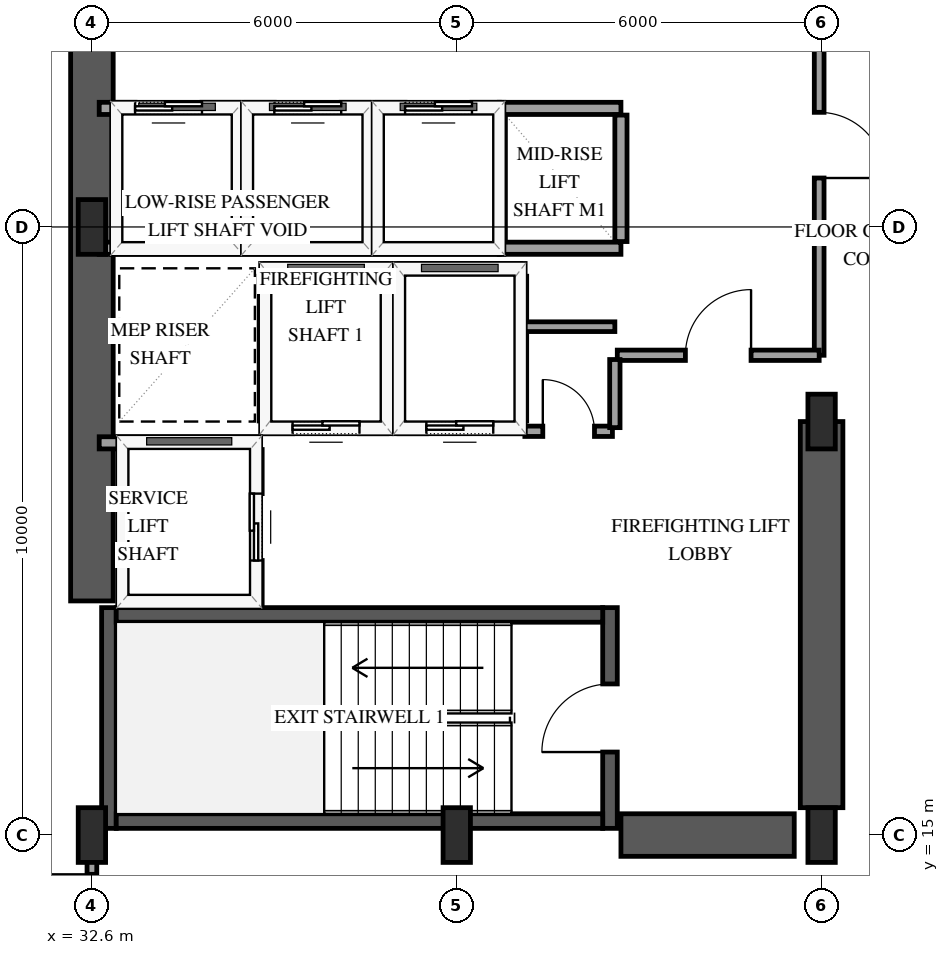
"""IFC4 building model, lengths in metres.
Left out: names, types, materials, properties, quantities, classifications, styles, units other than length and angle.
Written with IfcOpenShell. Run it as: python <this file> out.ifc"""

import sys

from ifc_helpers import new_model, si_unit, direction, frame, frame_2d, origin, origin_2d, place, context, subcontext, project, spatial, rectangle, extrude, element, fill, save


model = new_model("IFC4")
c1 = context("Model", 3, precision=1e-05, world=origin(), true_north=direction((0.0, 1.0)))
c2 = subcontext(c1, "Body", "Model", "MODEL_VIEW")
j1 = project(units=[si_unit("LENGTHUNIT", "METRE"), si_unit("PLANEANGLEUNIT", "RADIAN")], contexts=[c1])
p1 = place(None, origin())
s1 = spatial("IfcSite", under=j1, at=p1, CompositionType="ELEMENT")
p2 = place(p1, origin())
s2 = spatial("IfcBuilding", under=s1, at=p2, CompositionType="ELEMENT")
p3 = place(p2, frame((0.0, 0.0, 50.6)))
s3 = spatial("IfcBuildingStorey", under=s2, at=p3, CompositionType="ELEMENT", Elevation=50.6)
p4 = place(p3, frame((32.88, 15.11, 0.0), z_axis=(0.0, 0.0, 1.0), x_axis=(0.0, 1.0, 0.0)))
e1 = element("IfcWall", 1, at=p4, inside=s3, PredefinedType="SHEAR", context=c2, shape_type="SweptSolid", body=[
    extrude(rectangle(XDim=3.63, YDim=0.24, at=frame_2d((1.815, 0.0))), origin(), (0.0, 0.0, 1.0), 4.0),
])
p5 = place(p3, frame((41.12, 15.11, 0.0), z_axis=(0.0, 0.0, 1.0), x_axis=(0.0, 1.0, 0.0)))
e2 = element("IfcWall", 2, at=p5, inside=s3, PredefinedType="SHEAR", context=c2, shape_type="SweptSolid", body=[
    extrude(rectangle(XDim=3.63, YDim=0.24, at=frame_2d((1.815, 0.0))), origin(), (0.0, 0.0, 1.0), 4.0),
])
p6 = place(p5, frame((1.255, 0.0, 0.0)))
e3 = element("IfcOpeningElement", 3, at=p6, cuts=e2, PredefinedType="OPENING", context=c2, shape_type="SweptSolid", body=[
    extrude(rectangle(XDim=1.12, YDim=2.15, at=frame_2d((0.56, 1.075))), frame((0.0, 0.13, 0.0), z_axis=(0.0, -1.0, 0.0), x_axis=(1.0, 0.0, 0.0)), (0.0, 0.0, 1.0), 0.26),
])
for number, where, z_axis, x_axis in (
    (4, (33.0, 15.23, 0.0), (0.0, 0.0, 1.0), (1.0, 0.0, 0.0)),
    (5, (33.0, 18.62, 0.0), (0.0, 0.0, 1.0), (1.0, 0.0, 0.0)),
):
    element("IfcWall", number, at=place(p3, frame(where, z_axis=z_axis, x_axis=x_axis)), inside=s3, PredefinedType="SHEAR", context=c2, shape_type="SweptSolid", body=[
        extrude(rectangle(XDim=8.0, YDim=0.24, at=frame_2d((4.0, 0.0))), origin(), (0.0, 0.0, 1.0), 4.0),
    ])
p7 = place(p3, frame((32.6, 18.85, 0.0), z_axis=(0.0, 0.0, 1.0), x_axis=(0.0, 1.0, 0.0)))
e6 = element("IfcWall", 6, at=p7, inside=s3, PredefinedType="SHEAR", context=c2, shape_type="SweptSolid", body=[
    extrude(rectangle(XDim=12.3, YDim=0.7, at=frame_2d((6.15, 0.0))), origin(), (0.0, 0.0, 1.0), 4.0),
])
p8 = place(p3, frame((41.3, 15.0, 0.0), z_axis=(0.0, 0.0, 1.0), x_axis=(1.0, 0.0, 0.0)))
e7 = element("IfcWall", 7, at=p8, inside=s3, PredefinedType="SHEAR", context=c2, shape_type="SweptSolid", body=[
    extrude(rectangle(XDim=2.85, YDim=0.7, at=frame_2d((1.425, 0.0))), origin(), (0.0, 0.0, 1.0), 4.0),
])
p9 = place(p3, frame((44.6, 15.45, 0.0), z_axis=(0.0, 0.0, 1.0), x_axis=(0.0, 1.0, 0.0)))
e8 = element("IfcWall", 8, at=p9, inside=s3, PredefinedType="SHEAR", context=c2, shape_type="SweptSolid", body=[
    extrude(rectangle(XDim=6.35, YDim=0.7, at=frame_2d((3.175, 0.0))), origin(), (0.0, 0.0, 1.0), 4.0),
])
for number, where, z_axis, x_axis in (
    (9, (32.6, 15.0, 0.0), (0.0, 0.0, 1.0), (1.0, 0.0, 0.0)),
    (10, (32.6, 25.0, 0.0), (0.0, 0.0, 1.0), (1.0, 0.0, 0.0)),
    (11, (38.6, 15.0, 0.0), (0.0, 0.0, 1.0), (1.0, 0.0, 0.0)),
    (12, (44.6, 15.0, 0.0), (0.0, 0.0, 1.0), (1.0, 0.0, 0.0)),
    (13, (44.6, 21.8, 0.0), (0.0, 0.0, 1.0), (1.0, 0.0, 0.0)),
):
    element("IfcColumn", number, at=place(p3, frame(where, z_axis=z_axis, x_axis=x_axis)), inside=s3, PredefinedType="PILASTER", context=c2, shape_type="SweptSolid", body=[
        extrude(rectangle(XDim=0.45, YDim=0.9, at=origin_2d()), origin(), (0.0, 0.0, 1.0), 4.0),
    ])
p10 = place(p3, frame((35.45, 21.7, 0.0), z_axis=(0.0, 0.0, 1.0), x_axis=(1.0, 0.0, 0.0)))
e14 = element("IfcWall", 14, at=p10, inside=s3, PredefinedType="SOLIDWALL", context=c2, shape_type="SweptSolid", body=[
    extrude(rectangle(XDim=2.0, YDim=0.2, at=frame_2d((1.0, 0.0))), origin(), (0.0, 0.0, 1.0), 3.7),
])
p11 = place(p10, frame((0.45, 0.0, 0.0)))
e15 = element("IfcOpeningElement", 15, at=p11, cuts=e14, PredefinedType="OPENING", context=c2, shape_type="SweptSolid", body=[
    extrude(rectangle(XDim=1.1, YDim=2.15, at=frame_2d((0.55, 1.075))), frame((0.0, 0.11, 0.0), z_axis=(0.0, -1.0, 0.0), x_axis=(1.0, 0.0, 0.0)), (0.0, 0.0, 1.0), 0.22),
])
p12 = place(p3, frame((35.45, 24.3, 0.0), z_axis=(0.0, 0.0, 1.0), x_axis=(1.0, 0.0, 0.0)))
e16 = element("IfcWall", 16, at=p12, inside=s3, PredefinedType="SOLIDWALL", context=c2, shape_type="SweptSolid", body=[
    extrude(rectangle(XDim=2.0, YDim=0.2, at=frame_2d((1.0, 0.0))), origin(), (0.0, 0.0, 1.0), 3.7),
])
for number, where, z_axis, x_axis in (
    (17, (35.45, 21.81, 0.0), (0.0, 0.0, 1.0), (0.0, 1.0, 0.0)),
    (18, (37.45, 21.81, 0.0), (0.0, 0.0, 1.0), (0.0, 1.0, 0.0)),
):
    element("IfcWall", number, at=place(p3, frame(where, z_axis=z_axis, x_axis=x_axis)), inside=s3, PredefinedType="SOLIDWALL", context=c2, shape_type="SweptSolid", body=[
        extrude(rectangle(XDim=2.38, YDim=0.2, at=frame_2d((1.19, 0.0))), origin(), (0.0, 0.0, 1.0), 3.7),
    ])
p13 = place(p3, frame((37.65, 21.7, 0.0), z_axis=(0.0, 0.0, 1.0), x_axis=(1.0, 0.0, 0.0)))
e19 = element("IfcWall", 19, at=p13, inside=s3, PredefinedType="SOLIDWALL", context=c2, shape_type="SweptSolid", body=[
    extrude(rectangle(XDim=2.0, YDim=0.2, at=frame_2d((1.0, 0.0))), origin(), (0.0, 0.0, 1.0), 3.7),
])
p14 = place(p13, frame((0.45, 0.0, 0.0)))
e20 = element("IfcOpeningElement", 20, at=p14, cuts=e19, PredefinedType="OPENING", context=c2, shape_type="SweptSolid", body=[
    extrude(rectangle(XDim=1.1, YDim=2.15, at=frame_2d((0.55, 1.075))), frame((0.0, 0.11, 0.0), z_axis=(0.0, -1.0, 0.0), x_axis=(1.0, 0.0, 0.0)), (0.0, 0.0, 1.0), 0.22),
])
p15 = place(p3, frame((37.65, 24.3, 0.0), z_axis=(0.0, 0.0, 1.0), x_axis=(1.0, 0.0, 0.0)))
e21 = element("IfcWall", 21, at=p15, inside=s3, PredefinedType="SOLIDWALL", context=c2, shape_type="SweptSolid", body=[
    extrude(rectangle(XDim=2.0, YDim=0.2, at=frame_2d((1.0, 0.0))), origin(), (0.0, 0.0, 1.0), 3.7),
])
p16 = place(p3, frame((39.65, 21.81, 0.0), z_axis=(0.0, 0.0, 1.0), x_axis=(0.0, 1.0, 0.0)))
e22 = element("IfcWall", 22, at=p16, inside=s3, PredefinedType="SOLIDWALL", context=c2, shape_type="SweptSolid", body=[
    extrude(rectangle(XDim=2.38, YDim=0.2, at=frame_2d((1.19, 0.0))), origin(), (0.0, 0.0, 1.0), 3.7),
])
p17 = place(p3, frame((32.72, 21.45, 0.0), z_axis=(0.0, 0.0, 1.0), x_axis=(1.0, 0.0, 0.0)))
e23 = element("IfcWall", 23, at=p17, inside=s3, PredefinedType="SOLIDWALL", context=c2, shape_type="SweptSolid", body=[
    extrude(rectangle(XDim=2.58, YDim=0.2, at=frame_2d((1.29, 0.0))), origin(), (0.0, 0.0, 1.0), 3.7),
])
p18 = place(p3, frame((35.3, 18.79, 0.0), z_axis=(0.0, 0.0, 1.0), x_axis=(0.0, 1.0, 0.0)))
e24 = element("IfcWall", 24, at=p18, inside=s3, PredefinedType="SOLIDWALL", context=c2, shape_type="SweptSolid", body=[
    extrude(rectangle(XDim=2.55, YDim=0.2, at=frame_2d((1.275, 0.0))), origin(), (0.0, 0.0, 1.0), 3.7),
])
p19 = place(p18, frame((0.725, 0.0, 0.0)))
e25 = element("IfcOpeningElement", 25, at=p19, cuts=e24, PredefinedType="OPENING", context=c2, shape_type="SweptSolid", body=[
    extrude(rectangle(XDim=1.1, YDim=2.15, at=frame_2d((0.55, 1.075))), frame((0.0, 0.11, 0.0), z_axis=(0.0, -1.0, 0.0), x_axis=(1.0, 0.0, 0.0)), (0.0, 0.0, 1.0), 0.22),
])
p20 = place(p3, frame((32.72, 24.65, 0.0), z_axis=(0.0, 0.0, 1.0), x_axis=(1.0, 0.0, 0.0)))
e26 = element("IfcWall", 26, at=p20, inside=s3, PredefinedType="SOLIDWALL", context=c2, shape_type="SweptSolid", body=[
    extrude(rectangle(XDim=2.28, YDim=0.2, at=frame_2d((1.14, 0.0))), origin(), (0.0, 0.0, 1.0), 3.7),
])
p21 = place(p3, frame((32.72, 26.95, 0.0), z_axis=(0.0, 0.0, 1.0), x_axis=(1.0, 0.0, 0.0)))
e27 = element("IfcWall", 27, at=p21, inside=s3, PredefinedType="SOLIDWALL", context=c2, shape_type="SweptSolid", body=[
    extrude(rectangle(XDim=2.28, YDim=0.2, at=frame_2d((1.14, 0.0))), origin(), (0.0, 0.0, 1.0), 3.7),
])
p22 = place(p21, frame((0.59, 0.0, 0.0)))
e28 = element("IfcOpeningElement", 28, at=p22, cuts=e27, PredefinedType="OPENING", context=c2, shape_type="SweptSolid", body=[
    extrude(rectangle(XDim=1.1, YDim=2.15, at=frame_2d((0.55, 1.075))), frame((0.0, 0.11, 0.0), z_axis=(0.0, -1.0, 0.0), x_axis=(1.0, 0.0, 0.0)), (0.0, 0.0, 1.0), 0.22),
])
p23 = place(p3, frame((35.0, 24.76, 0.0), z_axis=(0.0, 0.0, 1.0), x_axis=(0.0, 1.0, 0.0)))
e29 = element("IfcWall", 29, at=p23, inside=s3, PredefinedType="SOLIDWALL", context=c2, shape_type="SweptSolid", body=[
    extrude(rectangle(XDim=2.08, YDim=0.2, at=frame_2d((1.04, 0.0))), origin(), (0.0, 0.0, 1.0), 3.7),
])
p24 = place(p3, frame((35.15, 24.65, 0.0), z_axis=(0.0, 0.0, 1.0), x_axis=(1.0, 0.0, 0.0)))
e30 = element("IfcWall", 30, at=p24, inside=s3, PredefinedType="SOLIDWALL", context=c2, shape_type="SweptSolid", body=[
    extrude(rectangle(XDim=2.0, YDim=0.2, at=frame_2d((1.0, 0.0))), origin(), (0.0, 0.0, 1.0), 3.7),
])
p25 = place(p3, frame((35.15, 26.95, 0.0), z_axis=(0.0, 0.0, 1.0), x_axis=(1.0, 0.0, 0.0)))
e31 = element("IfcWall", 31, at=p25, inside=s3, PredefinedType="SOLIDWALL", context=c2, shape_type="SweptSolid", body=[
    extrude(rectangle(XDim=2.0, YDim=0.2, at=frame_2d((1.0, 0.0))), origin(), (0.0, 0.0, 1.0), 3.7),
])
p26 = place(p25, frame((0.45, 0.0, 0.0)))
e32 = element("IfcOpeningElement", 32, at=p26, cuts=e31, PredefinedType="OPENING", context=c2, shape_type="SweptSolid", body=[
    extrude(rectangle(XDim=1.1, YDim=2.15, at=frame_2d((0.55, 1.075))), frame((0.0, 0.11, 0.0), z_axis=(0.0, -1.0, 0.0), x_axis=(1.0, 0.0, 0.0)), (0.0, 0.0, 1.0), 0.22),
])
p27 = place(p3, frame((37.15, 24.76, 0.0), z_axis=(0.0, 0.0, 1.0), x_axis=(0.0, 1.0, 0.0)))
e33 = element("IfcWall", 33, at=p27, inside=s3, PredefinedType="SOLIDWALL", context=c2, shape_type="SweptSolid", body=[
    extrude(rectangle(XDim=2.08, YDim=0.2, at=frame_2d((1.04, 0.0))), origin(), (0.0, 0.0, 1.0), 3.7),
])
p28 = place(p3, frame((37.3, 24.65, 0.0), z_axis=(0.0, 0.0, 1.0), x_axis=(1.0, 0.0, 0.0)))
e34 = element("IfcWall", 34, at=p28, inside=s3, PredefinedType="SOLIDWALL", context=c2, shape_type="SweptSolid", body=[
    extrude(rectangle(XDim=2.0, YDim=0.2, at=frame_2d((1.0, 0.0))), origin(), (0.0, 0.0, 1.0), 3.7),
])
p29 = place(p3, frame((37.3, 26.95, 0.0), z_axis=(0.0, 0.0, 1.0), x_axis=(1.0, 0.0, 0.0)))
e35 = element("IfcWall", 35, at=p29, inside=s3, PredefinedType="SOLIDWALL", context=c2, shape_type="SweptSolid", body=[
    extrude(rectangle(XDim=2.0, YDim=0.2, at=frame_2d((1.0, 0.0))), origin(), (0.0, 0.0, 1.0), 3.7),
])
p30 = place(p29, frame((0.45, 0.0, 0.0)))
e36 = element("IfcOpeningElement", 36, at=p30, cuts=e35, PredefinedType="OPENING", context=c2, shape_type="SweptSolid", body=[
    extrude(rectangle(XDim=1.1, YDim=2.15, at=frame_2d((0.55, 1.075))), frame((0.0, 0.11, 0.0), z_axis=(0.0, -1.0, 0.0), x_axis=(1.0, 0.0, 0.0)), (0.0, 0.0, 1.0), 0.22),
])
p31 = place(p3, frame((39.3, 24.76, 0.0), z_axis=(0.0, 0.0, 1.0), x_axis=(0.0, 1.0, 0.0)))
e37 = element("IfcWall", 37, at=p31, inside=s3, PredefinedType="SOLIDWALL", context=c2, shape_type="SweptSolid", body=[
    extrude(rectangle(XDim=2.08, YDim=0.2, at=frame_2d((1.04, 0.0))), origin(), (0.0, 0.0, 1.0), 3.7),
])
for number, where, z_axis, x_axis in (
    (38, (39.3, 24.65, 0.0), (0.0, 0.0, 1.0), (1.0, 0.0, 0.0)),
    (39, (39.3, 26.95, 0.0), (0.0, 0.0, 1.0), (1.0, 0.0, 0.0)),
):
    element("IfcWall", number, at=place(p3, frame(where, z_axis=z_axis, x_axis=x_axis)), inside=s3, PredefinedType="SOLIDWALL", context=c2, shape_type="SweptSolid", body=[
        extrude(rectangle(XDim=2.0, YDim=0.2, at=frame_2d((1.0, 0.0))), origin(), (0.0, 0.0, 1.0), 3.7),
    ])
p32 = place(p3, frame((41.3, 24.76, 0.0), z_axis=(0.0, 0.0, 1.0), x_axis=(0.0, 1.0, 0.0)))
e40 = element("IfcWall", 40, at=p32, inside=s3, PredefinedType="SOLIDWALL", context=c2, shape_type="SweptSolid", body=[
    extrude(rectangle(XDim=2.08, YDim=0.2, at=frame_2d((1.04, 0.0))), origin(), (0.0, 0.0, 1.0), 3.7),
])
p33 = place(p3, frame((44.56, 29.8, 0.0), z_axis=(0.0, 0.0, 1.0), x_axis=(0.0, -1.0, 0.0)))
e41 = element("IfcWall", 41, at=p33, inside=s3, PredefinedType="PARTITIONING", context=c2, shape_type="SweptSolid", body=[
    extrude(rectangle(XDim=6.91, YDim=0.16, at=frame_2d((3.455, 0.0))), origin(), (0.0, 0.0, 1.0), 2.74),
])
p34 = place(p33, frame((2.915, 0.0, 0.0)))
e42 = element("IfcOpeningElement", 42, at=p34, cuts=e41, PredefinedType="OPENING", context=c2, shape_type="SweptSolid", body=[
    extrude(rectangle(XDim=1.08, YDim=2.15, at=frame_2d((0.54, 1.075))), frame((0.0, 0.09, 0.0), z_axis=(0.0, -1.0, 0.0), x_axis=(1.0, 0.0, 0.0)), (0.0, 0.0, 1.0), 0.18),
])
p35 = place(p3, frame((41.24, 22.89, 0.0), z_axis=(0.0, 0.0, 1.0), x_axis=(1.0, 0.0, 0.0)))
e43 = element("IfcWall", 43, at=p35, inside=s3, PredefinedType="PARTITIONING", context=c2, shape_type="SweptSolid", body=[
    extrude(rectangle(XDim=3.32, YDim=0.17, at=frame_2d((1.66, 0.0))), origin(), (0.0, 0.0, 1.0), 3.7),
])
p36 = place(p35, frame((1.12, 0.0, 0.0)))
e44 = element("IfcOpeningElement", 44, at=p36, cuts=e43, PredefinedType="OPENING", context=c2, shape_type="SweptSolid", body=[
    extrude(rectangle(XDim=1.08, YDim=2.15, at=frame_2d((0.54, 1.075))), frame((0.0, 0.095, 0.0), z_axis=(0.0, -1.0, 0.0), x_axis=(1.0, 0.0, 0.0)), (0.0, 0.0, 1.0), 0.19),
])
p37 = place(p3, frame((32.6, 13.02, 0.0), z_axis=(0.0, 0.0, 1.0), x_axis=(0.0, 1.0, 0.0)))
e45 = element("IfcWall", 45, at=p37, inside=s3, PredefinedType="PARTITIONING", context=c2, shape_type="SweptSolid", body=[
    extrude(rectangle(XDim=1.91, YDim=0.16, at=frame_2d((0.955, 0.0))), origin(), (0.0, 0.0, 1.0), 3.7),
])
p38 = place(p37, frame((0.384, 0.0, 0.0)))
e46 = element("IfcOpeningElement", 46, at=p38, cuts=e45, PredefinedType="OPENING", context=c2, shape_type="SweptSolid", body=[
    extrude(rectangle(XDim=0.95, YDim=2.15, at=frame_2d((0.475, 1.075))), frame((0.0, 0.09, 0.0), z_axis=(0.0, -1.0, 0.0), x_axis=(1.0, 0.0, 0.0)), (0.0, 0.0, 1.0), 0.18),
])
p39 = place(p3, frame((39.72, 21.64, 0.0), z_axis=(0.0, 0.0, 1.0), x_axis=(1.0, 0.0, 0.0)))
e47 = element("IfcWall", 47, at=p39, inside=s3, PredefinedType="PARTITIONING", context=c2, shape_type="SweptSolid", body=[
    extrude(rectangle(XDim=1.44, YDim=0.17, at=frame_2d((0.72, 0.0))), origin(), (0.0, 0.0, 1.0), 3.7),
])
p40 = place(p39, frame((0.295, 0.0, 0.0)))
e48 = element("IfcOpeningElement", 48, at=p40, cuts=e47, PredefinedType="OPENING", context=c2, shape_type="SweptSolid", body=[
    extrude(rectangle(XDim=0.85, YDim=2.1, at=frame_2d((0.425, 1.05))), frame((0.0, 0.095, 0.0), z_axis=(0.0, -1.0, 0.0), x_axis=(1.0, 0.0, 0.0)), (0.0, 0.0, 1.0), 0.19),
])
p41 = place(p3, frame((41.2, 21.7, 0.0), z_axis=(0.0, 0.0, 1.0), x_axis=(0.0, 1.0, 0.0)))
e49 = element("IfcWall", 49, at=p41, inside=s3, PredefinedType="PARTITIONING", context=c2, shape_type="SweptSolid", body=[
    extrude(rectangle(XDim=1.12, YDim=0.17, at=frame_2d((0.56, 0.0))), origin(), (0.0, 0.0, 1.0), 3.7),
])
p42 = place(p3, frame((41.2, 23.36, 0.0), z_axis=(0.0, 0.0, 1.0), x_axis=(-1.0, 0.0, 0.0)))
e50 = element("IfcWall", 50, at=p42, inside=s3, PredefinedType="PARTITIONING", context=c2, shape_type="SweptSolid", body=[
    extrude(rectangle(XDim=1.48, YDim=0.16, at=frame_2d((0.74, 0.0))), origin(), (0.0, 0.0, 1.0), 3.7),
])
p43 = place(p11, origin())
e51 = element("IfcDoor", 51, at=p43, inside=s3, OperationType="SLIDING_TO_LEFT", PredefinedType="DOOR", context=c2, shape_type="SweptSolid", body=[
    extrude(rectangle(XDim=1.1, YDim=2.15, at=frame_2d((0.55, 1.075))), frame((0.0, 0.025, 0.0), z_axis=(0.0, -1.0, 0.0), x_axis=(1.0, 0.0, 0.0)), (0.0, 0.0, 1.0), 0.05),
])
fill(e15, e51)
p44 = place(p14, origin())
e52 = element("IfcDoor", 52, at=p44, inside=s3, OperationType="SLIDING_TO_LEFT", PredefinedType="DOOR", context=c2, shape_type="SweptSolid", body=[
    extrude(rectangle(XDim=1.1, YDim=2.15, at=frame_2d((0.55, 1.075))), frame((0.0, 0.025, 0.0), z_axis=(0.0, -1.0, 0.0), x_axis=(1.0, 0.0, 0.0)), (0.0, 0.0, 1.0), 0.05),
])
fill(e20, e52)
p45 = place(p19, origin())
e53 = element("IfcDoor", 53, at=p45, inside=s3, OperationType="SLIDING_TO_LEFT", PredefinedType="DOOR", context=c2, shape_type="SweptSolid", body=[
    extrude(rectangle(XDim=1.1, YDim=2.15, at=frame_2d((0.55, 1.075))), frame((0.0, 0.025, 0.0), z_axis=(0.0, -1.0, 0.0), x_axis=(1.0, 0.0, 0.0)), (0.0, 0.0, 1.0), 0.05),
])
fill(e25, e53)
p46 = place(p22, origin())
e54 = element("IfcDoor", 54, at=p46, inside=s3, OperationType="SLIDING_TO_LEFT", PredefinedType="DOOR", context=c2, shape_type="SweptSolid", body=[
    extrude(rectangle(XDim=1.1, YDim=2.15, at=frame_2d((0.55, 1.075))), frame((0.0, 0.025, 0.0), z_axis=(0.0, -1.0, 0.0), x_axis=(1.0, 0.0, 0.0)), (0.0, 0.0, 1.0), 0.05),
])
fill(e28, e54)
p47 = place(p26, origin())
e55 = element("IfcDoor", 55, at=p47, inside=s3, OperationType="SLIDING_TO_LEFT", PredefinedType="DOOR", context=c2, shape_type="SweptSolid", body=[
    extrude(rectangle(XDim=1.1, YDim=2.15, at=frame_2d((0.55, 1.075))), frame((0.0, 0.025, 0.0), z_axis=(0.0, -1.0, 0.0), x_axis=(1.0, 0.0, 0.0)), (0.0, 0.0, 1.0), 0.05),
])
fill(e32, e55)
p48 = place(p30, origin())
e56 = element("IfcDoor", 56, at=p48, inside=s3, OperationType="SLIDING_TO_LEFT", PredefinedType="DOOR", context=c2, shape_type="SweptSolid", body=[
    extrude(rectangle(XDim=1.1, YDim=2.15, at=frame_2d((0.55, 1.075))), frame((0.0, 0.025, 0.0), z_axis=(0.0, -1.0, 0.0), x_axis=(1.0, 0.0, 0.0)), (0.0, 0.0, 1.0), 0.05),
])
fill(e36, e56)
p49 = place(p6, origin())
e57 = element("IfcDoor", 57, at=p49, inside=s3, OperationType="SINGLE_SWING_LEFT", PredefinedType="DOOR", context=c2, shape_type="SweptSolid", body=[
    extrude(rectangle(XDim=1.12, YDim=2.15, at=frame_2d((0.56, 1.075))), frame((0.0, 0.025, 0.0), z_axis=(0.0, -1.0, 0.0), x_axis=(1.0, 0.0, 0.0)), (0.0, 0.0, 1.0), 0.05),
])
fill(e3, e57)
p50 = place(p34, origin())
e58 = element("IfcDoor", 58, at=p50, inside=s3, OperationType="SINGLE_SWING_RIGHT", PredefinedType="DOOR", context=c2, shape_type="SweptSolid", body=[
    extrude(rectangle(XDim=1.08, YDim=2.15, at=frame_2d((0.54, 1.075))), frame((0.0, 0.025, 0.0), z_axis=(0.0, -1.0, 0.0), x_axis=(1.0, 0.0, 0.0)), (0.0, 0.0, 1.0), 0.05),
])
fill(e42, e58)
p51 = place(p36, origin())
e59 = element("IfcDoor", 59, at=p51, inside=s3, OperationType="SINGLE_SWING_RIGHT", PredefinedType="DOOR", context=c2, shape_type="SweptSolid", body=[
    extrude(rectangle(XDim=1.08, YDim=2.15, at=frame_2d((0.54, 1.075))), frame((0.0, 0.025, 0.0), z_axis=(0.0, -1.0, 0.0), x_axis=(1.0, 0.0, 0.0)), (0.0, 0.0, 1.0), 0.05),
])
fill(e44, e59)
p52 = place(p38, origin())
e60 = element("IfcDoor", 60, at=p52, inside=s3, OperationType="SINGLE_SWING_RIGHT", PredefinedType="DOOR", context=c2, shape_type="SweptSolid", body=[
    extrude(rectangle(XDim=0.95, YDim=2.15, at=frame_2d((0.475, 1.075))), frame((0.0, 0.025, 0.0), z_axis=(0.0, -1.0, 0.0), x_axis=(1.0, 0.0, 0.0)), (0.0, 0.0, 1.0), 0.05),
])
fill(e46, e60)
p53 = place(p40, origin())
e61 = element("IfcDoor", 61, at=p53, inside=s3, OperationType="SINGLE_SWING_LEFT", PredefinedType="DOOR", context=c2, shape_type="SweptSolid", body=[
    extrude(rectangle(XDim=0.85, YDim=2.1, at=frame_2d((0.425, 1.05))), frame((0.0, 0.025, 0.0), z_axis=(0.0, -1.0, 0.0), x_axis=(1.0, 0.0, 0.0)), (0.0, 0.0, 1.0), 0.05),
])
fill(e48, e61)
save(model, sys.argv[1])
